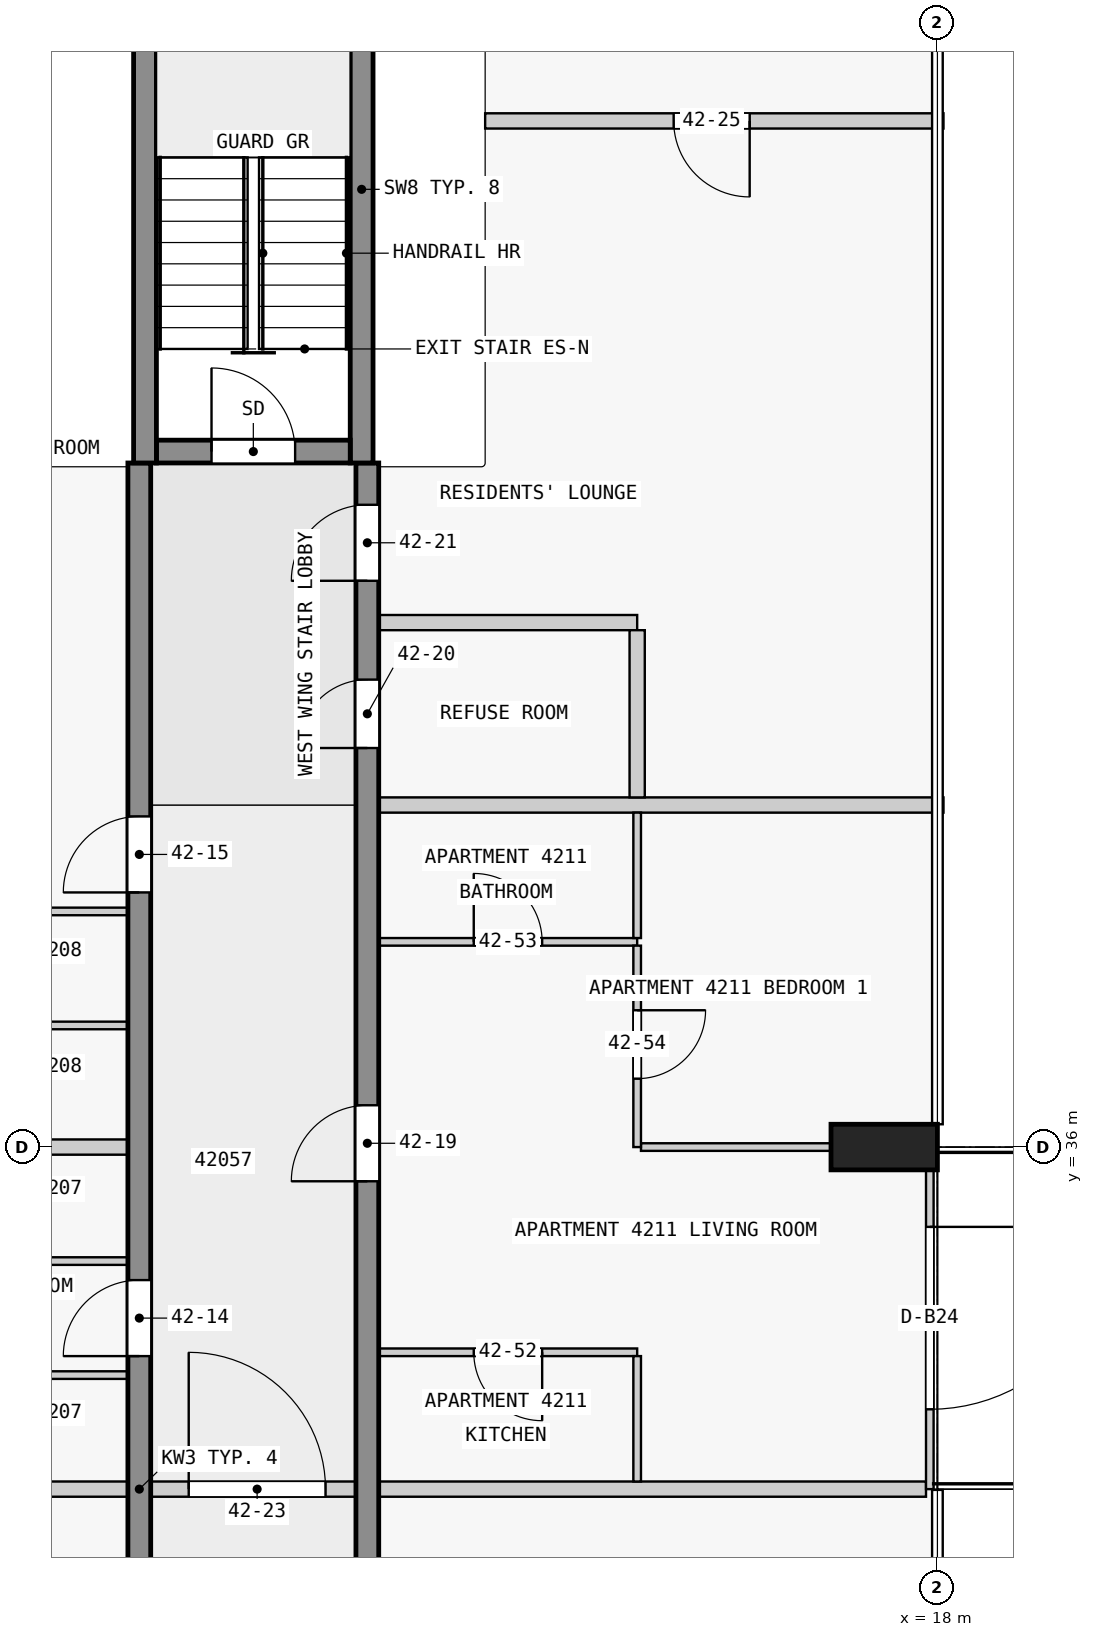
"""IFC4 building model, lengths in metres.
Left out: names, types, materials, properties, quantities, classifications, styles, units other than length and angle.
Written with IfcOpenShell. Run it as: python <this file> out.ifc"""

import sys

from ifc_helpers import new_model, si_unit, direction, frame, frame_2d, origin, origin_2d, place, context, subcontext, project, spatial, rectangle, extrude, element, fill, save


model = new_model("IFC4")
c1 = context("Model", 3, precision=1e-05, world=origin(), true_north=direction((0.0, 1.0)))
c2 = subcontext(c1, "Body", "Model", "MODEL_VIEW")
j1 = project(units=[si_unit("LENGTHUNIT", "METRE"), si_unit("PLANEANGLEUNIT", "RADIAN")], contexts=[c1])
p1 = place(None, origin())
s1 = spatial("IfcSite", under=j1, at=p1, CompositionType="ELEMENT")
p2 = place(p1, origin())
s2 = spatial("IfcBuilding", under=s1, at=p2, CompositionType="ELEMENT")
p3 = place(p2, frame((0.0, 0.0, 163.9)))
s3 = spatial("IfcBuildingStorey", under=s2, at=p3, CompositionType="ELEMENT", Elevation=163.9)
p4 = place(p3, frame((17.3, 36.0, 0.0), z_axis=(0.0, 0.0, 1.0), x_axis=(0.0, 1.0, 0.0)))
e1 = element("IfcColumn", 1, at=p4, inside=s3, PredefinedType="COLUMN", context=c2, shape_type="SweptSolid", body=[
    extrude(rectangle(XDim=0.6, YDim=1.4, at=origin_2d()), origin(), (0.0, 0.0, 1.0), 3.5),
])
p5 = place(p3, frame((7.725, 45.15, 0.0), z_axis=(0.0, 0.0, 1.0), x_axis=(1.0, 0.0, 0.0)))
e2 = element("IfcWall", 2, at=p5, inside=s3, PredefinedType="SHEAR", context=c2, shape_type="SweptSolid", body=[
    extrude(rectangle(XDim=2.55, YDim=0.3, at=frame_2d((1.275, 0.0))), origin(), (0.0, 0.0, 1.0), 3.5),
])
p6 = place(p5, frame((0.725, 0.0, 0.0)))
e3 = element("IfcOpeningElement", 3, at=p6, cuts=e2, PredefinedType="OPENING", context=c2, shape_type="SweptSolid", body=[
    extrude(rectangle(XDim=1.1, YDim=2.1, at=frame_2d((0.55, 1.05))), frame((0.0, 0.16, 0.0), z_axis=(0.0, -1.0, 0.0), x_axis=(1.0, 0.0, 0.0)), (0.0, 0.0, 1.0), 0.32),
])
for number, where, z_axis, x_axis in (
    (4, (7.575, 45.0, 0.0), (0.0, 0.0, 1.0), (0.0, 1.0, 0.0)),
    (5, (10.425, 45.0, 0.0), (0.0, 0.0, 1.0), (0.0, 1.0, 0.0)),
):
    element("IfcWall", number, at=place(p3, frame(where, z_axis=z_axis, x_axis=x_axis)), inside=s3, PredefinedType="SHEAR", context=c2, shape_type="SweptSolid", body=[
        extrude(rectangle(XDim=7.2, YDim=0.3, at=frame_2d((3.6, 0.0))), origin(), (0.0, 0.0, 1.0), 3.5),
    ])
p7 = place(p3, frame((7.5, 18.0, 0.0), z_axis=(0.0, 0.0, 1.0), x_axis=(0.0, 1.0, 0.0)))
e6 = element("IfcWall", 6, at=p7, inside=s3, PredefinedType="SHEAR", context=c2, shape_type="SweptSolid", body=[
    extrude(rectangle(XDim=27.0, YDim=0.3, at=frame_2d((13.5, 0.0))), origin(), (0.0, 0.0, 1.0), 3.25),
])
p8 = place(p7, frame((1.75, 0.0, 0.0)))
e7 = element("IfcOpeningElement", 7, at=p8, cuts=e6, PredefinedType="OPENING", context=c2, shape_type="SweptSolid", body=[
    extrude(rectangle(XDim=1.0, YDim=2.1, at=frame_2d((0.5, 1.05))), frame((0.0, 0.16, 0.0), z_axis=(0.0, -1.0, 0.0), x_axis=(1.0, 0.0, 0.0)), (0.0, 0.0, 1.0), 0.32),
])
p9 = place(p7, frame((6.25, 0.0, 0.0)))
e8 = element("IfcOpeningElement", 8, at=p9, cuts=e6, PredefinedType="OPENING", context=c2, shape_type="SweptSolid", body=[
    extrude(rectangle(XDim=1.0, YDim=2.1, at=frame_2d((0.5, 1.05))), frame((0.0, 0.16, 0.0), z_axis=(0.0, -1.0, 0.0), x_axis=(1.0, 0.0, 0.0)), (0.0, 0.0, 1.0), 0.32),
])
p10 = place(p7, frame((10.75, 0.0, 0.0)))
e9 = element("IfcOpeningElement", 9, at=p10, cuts=e6, PredefinedType="OPENING", context=c2, shape_type="SweptSolid", body=[
    extrude(rectangle(XDim=1.0, YDim=2.1, at=frame_2d((0.5, 1.05))), frame((0.0, 0.16, 0.0), z_axis=(0.0, -1.0, 0.0), x_axis=(1.0, 0.0, 0.0)), (0.0, 0.0, 1.0), 0.32),
])
p11 = place(p7, frame((15.25, 0.0, 0.0)))
e10 = element("IfcOpeningElement", 10, at=p11, cuts=e6, PredefinedType="OPENING", context=c2, shape_type="SweptSolid", body=[
    extrude(rectangle(XDim=1.0, YDim=2.1, at=frame_2d((0.5, 1.05))), frame((0.0, 0.16, 0.0), z_axis=(0.0, -1.0, 0.0), x_axis=(1.0, 0.0, 0.0)), (0.0, 0.0, 1.0), 0.32),
])
p12 = place(p7, frame((21.35, 0.0, 0.0)))
e11 = element("IfcOpeningElement", 11, at=p12, cuts=e6, PredefinedType="OPENING", context=c2, shape_type="SweptSolid", body=[
    extrude(rectangle(XDim=1.0, YDim=2.1, at=frame_2d((0.5, 1.05))), frame((0.0, 0.16, 0.0), z_axis=(0.0, -1.0, 0.0), x_axis=(1.0, 0.0, 0.0)), (0.0, 0.0, 1.0), 0.32),
])
p13 = place(p3, frame((10.5, 18.0, 0.0), z_axis=(0.0, 0.0, 1.0), x_axis=(0.0, 1.0, 0.0)))
e12 = element("IfcWall", 12, at=p13, inside=s3, PredefinedType="SHEAR", context=c2, shape_type="SweptSolid", body=[
    extrude(rectangle(XDim=27.0, YDim=0.3, at=frame_2d((13.5, 0.0))), origin(), (0.0, 0.0, 1.0), 3.25),
])
p14 = place(p13, frame((1.75, 0.0, 0.0)))
e13 = element("IfcOpeningElement", 13, at=p14, cuts=e12, PredefinedType="OPENING", context=c2, shape_type="SweptSolid", body=[
    extrude(rectangle(XDim=1.0, YDim=2.1, at=frame_2d((0.5, 1.05))), frame((0.0, 0.16, 0.0), z_axis=(0.0, -1.0, 0.0), x_axis=(1.0, 0.0, 0.0)), (0.0, 0.0, 1.0), 0.32),
])
p15 = place(p13, frame((6.25, 0.0, 0.0)))
e14 = element("IfcOpeningElement", 14, at=p15, cuts=e12, PredefinedType="OPENING", context=c2, shape_type="SweptSolid", body=[
    extrude(rectangle(XDim=1.0, YDim=2.1, at=frame_2d((0.5, 1.05))), frame((0.0, 0.16, 0.0), z_axis=(0.0, -1.0, 0.0), x_axis=(1.0, 0.0, 0.0)), (0.0, 0.0, 1.0), 0.32),
])
p16 = place(p13, frame((10.35, 0.0, 0.0)))
e15 = element("IfcOpeningElement", 15, at=p16, cuts=e12, PredefinedType="OPENING", context=c2, shape_type="SweptSolid", body=[
    extrude(rectangle(XDim=1.8, YDim=2.1, at=frame_2d((0.9, 1.05))), frame((0.0, 0.16, 0.0), z_axis=(0.0, -1.0, 0.0), x_axis=(1.0, 0.0, 0.0)), (0.0, 0.0, 1.0), 0.32),
])
p17 = place(p13, frame((17.55, 0.0, 0.0)))
e16 = element("IfcOpeningElement", 16, at=p17, cuts=e12, PredefinedType="OPENING", context=c2, shape_type="SweptSolid", body=[
    extrude(rectangle(XDim=1.0, YDim=2.1, at=frame_2d((0.5, 1.05))), frame((0.0, 0.16, 0.0), z_axis=(0.0, -1.0, 0.0), x_axis=(1.0, 0.0, 0.0)), (0.0, 0.0, 1.0), 0.32),
])
p18 = place(p13, frame((23.25, 0.0, 0.0)))
e17 = element("IfcOpeningElement", 17, at=p18, cuts=e12, PredefinedType="OPENING", context=c2, shape_type="SweptSolid", body=[
    extrude(rectangle(XDim=0.9, YDim=2.1, at=frame_2d((0.45, 1.05))), frame((0.0, 0.16, 0.0), z_axis=(0.0, -1.0, 0.0), x_axis=(1.0, 0.0, 0.0)), (0.0, 0.0, 1.0), 0.32),
])
p19 = place(p13, frame((25.45, 0.0, 0.0)))
e18 = element("IfcOpeningElement", 18, at=p19, cuts=e12, PredefinedType="OPENING", context=c2, shape_type="SweptSolid", body=[
    extrude(rectangle(XDim=1.0, YDim=2.1, at=frame_2d((0.5, 1.05))), frame((0.0, 0.16, 0.0), z_axis=(0.0, -1.0, 0.0), x_axis=(1.0, 0.0, 0.0)), (0.0, 0.0, 1.0), 0.32),
])
p20 = place(p3, frame((17.9, 36.0, 0.0), z_axis=(0.0, 0.0, 1.0), x_axis=(0.0, -1.0, 0.0)))
e19 = element("IfcWall", 19, at=p20, inside=s3, PredefinedType="STANDARD", context=c2, shape_type="SweptSolid", body=[
    extrude(rectangle(XDim=4.5, YDim=0.1, at=frame_2d((2.25, 0.0))), origin(), (0.0, 0.0, 1.0), 3.25),
])
p21 = place(p20, frame((1.05, 0.0, 0.0)))
e20 = element("IfcOpeningElement", 20, at=p21, cuts=e19, PredefinedType="OPENING", context=c2, shape_type="SweptSolid", body=[
    extrude(rectangle(XDim=2.4, YDim=2.4, at=frame_2d((1.2, 1.2))), frame((0.0, 0.06, 0.0), z_axis=(0.0, -1.0, 0.0), x_axis=(1.0, 0.0, 0.0)), (0.0, 0.0, 1.0), 0.12),
])
for number, where, z_axis, x_axis in (
    (21, (7.35, 31.5, 0.0), (0.0, 0.0, 1.0), (-1.0, 0.0, 0.0)),
    (22, (17.85, 31.5, 0.0), (0.0, 0.0, 1.0), (-1.0, 0.0, 0.0)),
):
    element("IfcWall", number, at=place(p3, frame(where, z_axis=z_axis, x_axis=x_axis)), inside=s3, PredefinedType="PARTITIONING", context=c2, shape_type="SweptSolid", body=[
        extrude(rectangle(XDim=7.2, YDim=0.2, at=frame_2d((3.6, 0.0))), origin(), (0.0, 0.0, 1.0), 3.25),
    ])
p22 = place(p3, frame((7.35, 33.0, 0.0), z_axis=(0.0, 0.0, 1.0), x_axis=(-1.0, 0.0, 0.0)))
e23 = element("IfcWall", 23, at=p22, inside=s3, PredefinedType="PARTITIONING", context=c2, shape_type="SweptSolid", body=[
    extrude(rectangle(XDim=3.4, YDim=0.1, at=frame_2d((1.7, 0.0))), origin(), (0.0, 0.0, 1.0), 3.25),
])
p23 = place(p22, frame((1.25, 0.0, 0.0)))
e24 = element("IfcOpeningElement", 24, at=p23, cuts=e23, PredefinedType="OPENING", context=c2, shape_type="SweptSolid", body=[
    extrude(rectangle(XDim=0.9, YDim=2.1, at=frame_2d((0.45, 1.05))), frame((0.0, 0.06, 0.0), z_axis=(0.0, -1.0, 0.0), x_axis=(1.0, 0.0, 0.0)), (0.0, 0.0, 1.0), 0.12),
])
p24 = place(p3, frame((14.05, 33.3, 0.0), z_axis=(0.0, 0.0, 1.0), x_axis=(-1.0, 0.0, 0.0)))
e25 = element("IfcWall", 25, at=p24, inside=s3, PredefinedType="PARTITIONING", context=c2, shape_type="SweptSolid", body=[
    extrude(rectangle(XDim=3.4, YDim=0.1, at=frame_2d((1.7, 0.0))), origin(), (0.0, 0.0, 1.0), 3.25),
])
p25 = place(p24, frame((1.25, 0.0, 0.0)))
e26 = element("IfcOpeningElement", 26, at=p25, cuts=e25, PredefinedType="OPENING", context=c2, shape_type="SweptSolid", body=[
    extrude(rectangle(XDim=0.9, YDim=2.1, at=frame_2d((0.45, 1.05))), frame((0.0, 0.06, 0.0), z_axis=(0.0, -1.0, 0.0), x_axis=(1.0, 0.0, 0.0)), (0.0, 0.0, 1.0), 0.12),
])
p26 = place(p3, frame((4.0, 34.5, 0.0), z_axis=(0.0, 0.0, 1.0), x_axis=(1.0, 0.0, 0.0)))
e27 = element("IfcWall", 27, at=p26, inside=s3, PredefinedType="PARTITIONING", context=c2, shape_type="SweptSolid", body=[
    extrude(rectangle(XDim=3.35, YDim=0.1, at=frame_2d((1.675, 0.0))), origin(), (0.0, 0.0, 1.0), 3.25),
])
p27 = place(p26, frame((1.25, 0.0, 0.0)))
e28 = element("IfcOpeningElement", 28, at=p27, cuts=e27, PredefinedType="OPENING", context=c2, shape_type="SweptSolid", body=[
    extrude(rectangle(XDim=0.9, YDim=2.1, at=frame_2d((0.45, 1.05))), frame((0.0, 0.06, 0.0), z_axis=(0.0, -1.0, 0.0), x_axis=(1.0, 0.0, 0.0)), (0.0, 0.0, 1.0), 0.12),
])
p28 = place(p3, frame((14.1, 36.0, 0.0), z_axis=(0.0, 0.0, 1.0), x_axis=(1.0, 0.0, 0.0)))
e29 = element("IfcWall", 29, at=p28, inside=s3, PredefinedType="PARTITIONING", context=c2, shape_type="SweptSolid", body=[
    extrude(rectangle(XDim=2.5, YDim=0.1, at=frame_2d((1.25, 0.0))), origin(), (0.0, 0.0, 1.0), 3.25),
])
p29 = place(p3, frame((7.35, 36.0, 0.0), z_axis=(0.0, 0.0, 1.0), x_axis=(-1.0, 0.0, 0.0)))
e30 = element("IfcWall", 30, at=p29, inside=s3, PredefinedType="PARTITIONING", context=c2, shape_type="SweptSolid", body=[
    extrude(rectangle(XDim=3.4, YDim=0.2, at=frame_2d((1.7, 0.0))), origin(), (0.0, 0.0, 1.0), 3.25),
])
p30 = place(p3, frame((7.35, 37.6, 0.0), z_axis=(0.0, 0.0, 1.0), x_axis=(-1.0, 0.0, 0.0)))
e31 = element("IfcWall", 31, at=p30, inside=s3, PredefinedType="PARTITIONING", context=c2, shape_type="SweptSolid", body=[
    extrude(rectangle(XDim=3.35, YDim=0.1, at=frame_2d((1.675, 0.0))), origin(), (0.0, 0.0, 1.0), 3.25),
])
p31 = place(p3, frame((10.65, 38.7, 0.0), z_axis=(0.0, 0.0, 1.0), x_axis=(1.0, 0.0, 0.0)))
e32 = element("IfcWall", 32, at=p31, inside=s3, PredefinedType="PARTITIONING", context=c2, shape_type="SweptSolid", body=[
    extrude(rectangle(XDim=3.4, YDim=0.1, at=frame_2d((1.7, 0.0))), origin(), (0.0, 0.0, 1.0), 3.25),
])
p32 = place(p31, frame((1.25, 0.0, 0.0)))
e33 = element("IfcOpeningElement", 33, at=p32, cuts=e32, PredefinedType="OPENING", context=c2, shape_type="SweptSolid", body=[
    extrude(rectangle(XDim=0.9, YDim=2.1, at=frame_2d((0.45, 1.05))), frame((0.0, 0.06, 0.0), z_axis=(0.0, -1.0, 0.0), x_axis=(1.0, 0.0, 0.0)), (0.0, 0.0, 1.0), 0.12),
])
p33 = place(p3, frame((7.35, 39.1, 0.0), z_axis=(0.0, 0.0, 1.0), x_axis=(-1.0, 0.0, 0.0)))
e34 = element("IfcWall", 34, at=p33, inside=s3, PredefinedType="PARTITIONING", context=c2, shape_type="SweptSolid", body=[
    extrude(rectangle(XDim=3.35, YDim=0.1, at=frame_2d((1.675, 0.0))), origin(), (0.0, 0.0, 1.0), 3.25),
])
p34 = place(p33, frame((1.25, 0.0, 0.0)))
e35 = element("IfcOpeningElement", 35, at=p34, cuts=e34, PredefinedType="OPENING", context=c2, shape_type="SweptSolid", body=[
    extrude(rectangle(XDim=0.9, YDim=2.1, at=frame_2d((0.45, 1.05))), frame((0.0, 0.06, 0.0), z_axis=(0.0, -1.0, 0.0), x_axis=(1.0, 0.0, 0.0)), (0.0, 0.0, 1.0), 0.12),
])
p35 = place(p3, frame((18.08, 40.5, 0.0), z_axis=(0.0, 0.0, 1.0), x_axis=(-1.0, 0.0, 0.0)))
e36 = element("IfcWall", 36, at=p35, inside=s3, PredefinedType="PARTITIONING", context=c2, shape_type="SweptSolid", body=[
    extrude(rectangle(XDim=7.43, YDim=0.2, at=frame_2d((3.715, 0.0))), origin(), (0.0, 0.0, 1.0), 3.25),
])
p36 = place(p3, frame((14.05, 42.9, 0.0), z_axis=(0.0, 0.0, 1.0), x_axis=(-1.0, 0.0, 0.0)))
e37 = element("IfcWall", 37, at=p36, inside=s3, PredefinedType="PARTITIONING", context=c2, shape_type="SweptSolid", body=[
    extrude(rectangle(XDim=3.4, YDim=0.2, at=frame_2d((1.7, 0.0))), origin(), (0.0, 0.0, 1.0), 3.25),
])
p37 = place(p3, frame((18.08, 49.5, 0.0), z_axis=(0.0, 0.0, 1.0), x_axis=(-1.0, 0.0, 0.0)))
e38 = element("IfcWall", 38, at=p37, inside=s3, PredefinedType="PARTITIONING", context=c2, shape_type="SweptSolid", body=[
    extrude(rectangle(XDim=6.03, YDim=0.2, at=frame_2d((3.015, 0.0))), origin(), (0.0, 0.0, 1.0), 3.25),
])
p38 = place(p37, frame((2.55, 0.0, 0.0)))
e39 = element("IfcOpeningElement", 39, at=p38, cuts=e38, PredefinedType="OPENING", context=c2, shape_type="SweptSolid", body=[
    extrude(rectangle(XDim=1.0, YDim=2.1, at=frame_2d((0.5, 1.05))), frame((0.0, 0.11, 0.0), z_axis=(0.0, -1.0, 0.0), x_axis=(1.0, 0.0, 0.0)), (0.0, 0.0, 1.0), 0.22),
])
p39 = place(p3, frame((14.05, 38.65, 0.0), z_axis=(0.0, 0.0, 1.0), x_axis=(0.0, -1.0, 0.0)))
e40 = element("IfcWall", 40, at=p39, inside=s3, PredefinedType="PARTITIONING", context=c2, shape_type="SweptSolid", body=[
    extrude(rectangle(XDim=2.65, YDim=0.1, at=frame_2d((1.325, 0.0))), origin(), (0.0, 0.0, 1.0), 3.25),
])
p40 = place(p39, frame((0.85, 0.0, 0.0)))
e41 = element("IfcOpeningElement", 41, at=p40, cuts=e40, PredefinedType="OPENING", context=c2, shape_type="SweptSolid", body=[
    extrude(rectangle(XDim=0.9, YDim=2.1, at=frame_2d((0.45, 1.05))), frame((0.0, 0.06, 0.0), z_axis=(0.0, -1.0, 0.0), x_axis=(1.0, 0.0, 0.0)), (0.0, 0.0, 1.0), 0.12),
])
for number, where, z_axis, x_axis in (
    (42, (14.05, 31.6, 0.0), (0.0, 0.0, 1.0), (0.0, 1.0, 0.0)),
    (43, (14.05, 38.75, 0.0), (0.0, 0.0, 1.0), (0.0, 1.0, 0.0)),
):
    element("IfcWall", number, at=place(p3, frame(where, z_axis=z_axis, x_axis=x_axis)), inside=s3, PredefinedType="PARTITIONING", context=c2, shape_type="SweptSolid", body=[
        extrude(rectangle(XDim=1.65, YDim=0.1, at=frame_2d((0.825, 0.0))), origin(), (0.0, 0.0, 1.0), 3.25),
    ])
p41 = place(p3, frame((14.05, 40.6, 0.0), z_axis=(0.0, 0.0, 1.0), x_axis=(0.0, 1.0, 0.0)))
e44 = element("IfcWall", 44, at=p41, inside=s3, PredefinedType="PARTITIONING", context=c2, shape_type="SweptSolid", body=[
    extrude(rectangle(XDim=2.2, YDim=0.2, at=frame_2d((1.1, 0.0))), origin(), (0.0, 0.0, 1.0), 3.25),
])
p42 = place(p3, frame((7.45, 31.5, 0.0), z_axis=(0.0, 0.0, 1.0), x_axis=(1.0, 0.0, 0.0)))
e45 = element("IfcWall", 45, at=p42, inside=s3, PredefinedType="PARTITIONING", context=c2, shape_type="SweptSolid", body=[
    extrude(rectangle(XDim=3.1, YDim=0.2, at=frame_2d((1.55, 0.0))), origin(), (0.0, 0.0, 1.0), 3.25),
])
p43 = place(p42, frame((0.7, 0.0, 0.0)))
e46 = element("IfcOpeningElement", 46, at=p43, cuts=e45, PredefinedType="OPENING", context=c2, shape_type="SweptSolid", body=[
    extrude(rectangle(XDim=1.8, YDim=2.1, at=frame_2d((0.9, 1.05))), frame((0.0, 0.11, 0.0), z_axis=(0.0, -1.0, 0.0), x_axis=(1.0, 0.0, 0.0)), (0.0, 0.0, 1.0), 0.22),
])
p44 = place(p21, origin())
e47 = element("IfcDoor", 47, at=p44, inside=s3, OperationType="SINGLE_SWING_LEFT", PredefinedType="DOOR", context=c2, shape_type="SweptSolid", body=[
    extrude(rectangle(XDim=2.4, YDim=2.4, at=frame_2d((1.2, 1.2))), frame((0.0, 0.025, 0.0), z_axis=(0.0, -1.0, 0.0), x_axis=(1.0, 0.0, 0.0)), (0.0, 0.0, 1.0), 0.05),
])
fill(e20, e47)
p45 = place(p6, origin())
e48 = element("IfcDoor", 48, at=p45, inside=s3, OperationType="SINGLE_SWING_LEFT", PredefinedType="DOOR", context=c2, shape_type="SweptSolid", body=[
    extrude(rectangle(XDim=1.1, YDim=2.1, at=frame_2d((0.55, 1.05))), frame((0.0, 0.025, 0.0), z_axis=(0.0, -1.0, 0.0), x_axis=(1.0, 0.0, 0.0)), (0.0, 0.0, 1.0), 0.05),
])
fill(e3, e48)
p46 = place(p11, origin())
e49 = element("IfcDoor", 49, at=p46, inside=s3, OperationType="SINGLE_SWING_RIGHT", PredefinedType="DOOR", context=c2, shape_type="SweptSolid", body=[
    extrude(rectangle(XDim=1.0, YDim=2.1, at=frame_2d((0.5, 1.05))), frame((0.0, 0.025, 0.0), z_axis=(0.0, -1.0, 0.0), x_axis=(1.0, 0.0, 0.0)), (0.0, 0.0, 1.0), 0.05),
])
fill(e10, e49)
p47 = place(p12, origin())
e50 = element("IfcDoor", 50, at=p47, inside=s3, OperationType="SINGLE_SWING_RIGHT", PredefinedType="DOOR", context=c2, shape_type="SweptSolid", body=[
    extrude(rectangle(XDim=1.0, YDim=2.1, at=frame_2d((0.5, 1.05))), frame((0.0, 0.025, 0.0), z_axis=(0.0, -1.0, 0.0), x_axis=(1.0, 0.0, 0.0)), (0.0, 0.0, 1.0), 0.05),
])
fill(e11, e50)
p48 = place(p17, origin())
e51 = element("IfcDoor", 51, at=p48, inside=s3, OperationType="SINGLE_SWING_RIGHT", PredefinedType="DOOR", context=c2, shape_type="SweptSolid", body=[
    extrude(rectangle(XDim=1.0, YDim=2.1, at=frame_2d((0.5, 1.05))), frame((0.0, 0.025, 0.0), z_axis=(0.0, -1.0, 0.0), x_axis=(1.0, 0.0, 0.0)), (0.0, 0.0, 1.0), 0.05),
])
fill(e16, e51)
p49 = place(p18, origin())
e52 = element("IfcDoor", 52, at=p49, inside=s3, OperationType="SINGLE_SWING_RIGHT", PredefinedType="DOOR", context=c2, shape_type="SweptSolid", body=[
    extrude(rectangle(XDim=0.9, YDim=2.1, at=frame_2d((0.45, 1.05))), frame((0.0, 0.025, 0.0), z_axis=(0.0, -1.0, 0.0), x_axis=(1.0, 0.0, 0.0)), (0.0, 0.0, 1.0), 0.05),
])
fill(e17, e52)
p50 = place(p19, origin())
e53 = element("IfcDoor", 53, at=p50, inside=s3, OperationType="SINGLE_SWING_RIGHT", PredefinedType="DOOR", context=c2, shape_type="SweptSolid", body=[
    extrude(rectangle(XDim=1.0, YDim=2.1, at=frame_2d((0.5, 1.05))), frame((0.0, 0.025, 0.0), z_axis=(0.0, -1.0, 0.0), x_axis=(1.0, 0.0, 0.0)), (0.0, 0.0, 1.0), 0.05),
])
fill(e18, e53)
p51 = place(p43, origin())
e54 = element("IfcDoor", 54, at=p51, inside=s3, OperationType="SINGLE_SWING_RIGHT", PredefinedType="DOOR", context=c2, shape_type="SweptSolid", body=[
    extrude(rectangle(XDim=1.8, YDim=2.1, at=frame_2d((0.9, 1.05))), frame((0.0, 0.025, 0.0), z_axis=(0.0, -1.0, 0.0), x_axis=(1.0, 0.0, 0.0)), (0.0, 0.0, 1.0), 0.05),
])
fill(e46, e54)
p52 = place(p38, origin())
e55 = element("IfcDoor", 55, at=p52, inside=s3, OperationType="SINGLE_SWING_RIGHT", PredefinedType="DOOR", context=c2, shape_type="SweptSolid", body=[
    extrude(rectangle(XDim=1.0, YDim=2.1, at=frame_2d((0.5, 1.05))), frame((0.0, 0.025, 0.0), z_axis=(0.0, -1.0, 0.0), x_axis=(1.0, 0.0, 0.0)), (0.0, 0.0, 1.0), 0.05),
])
fill(e39, e55)
p53 = place(p25, origin())
e56 = element("IfcDoor", 56, at=p53, inside=s3, OperationType="SINGLE_SWING_LEFT", PredefinedType="DOOR", context=c2, shape_type="SweptSolid", body=[
    extrude(rectangle(XDim=0.9, YDim=2.1, at=frame_2d((0.45, 1.05))), frame((0.0, 0.025, 0.0), z_axis=(0.0, -1.0, 0.0), x_axis=(1.0, 0.0, 0.0)), (0.0, 0.0, 1.0), 0.05),
])
fill(e26, e56)
p54 = place(p32, origin())
e57 = element("IfcDoor", 57, at=p54, inside=s3, OperationType="SINGLE_SWING_LEFT", PredefinedType="DOOR", context=c2, shape_type="SweptSolid", body=[
    extrude(rectangle(XDim=0.9, YDim=2.1, at=frame_2d((0.45, 1.05))), frame((0.0, 0.025, 0.0), z_axis=(0.0, -1.0, 0.0), x_axis=(1.0, 0.0, 0.0)), (0.0, 0.0, 1.0), 0.05),
])
fill(e33, e57)
p55 = place(p40, origin())
e58 = element("IfcDoor", 58, at=p55, inside=s3, OperationType="SINGLE_SWING_LEFT", PredefinedType="DOOR", context=c2, shape_type="SweptSolid", body=[
    extrude(rectangle(XDim=0.9, YDim=2.1, at=frame_2d((0.45, 1.05))), frame((0.0, 0.025, 0.0), z_axis=(0.0, -1.0, 0.0), x_axis=(1.0, 0.0, 0.0)), (0.0, 0.0, 1.0), 0.05),
])
fill(e41, e58)
save(model, sys.argv[1])
